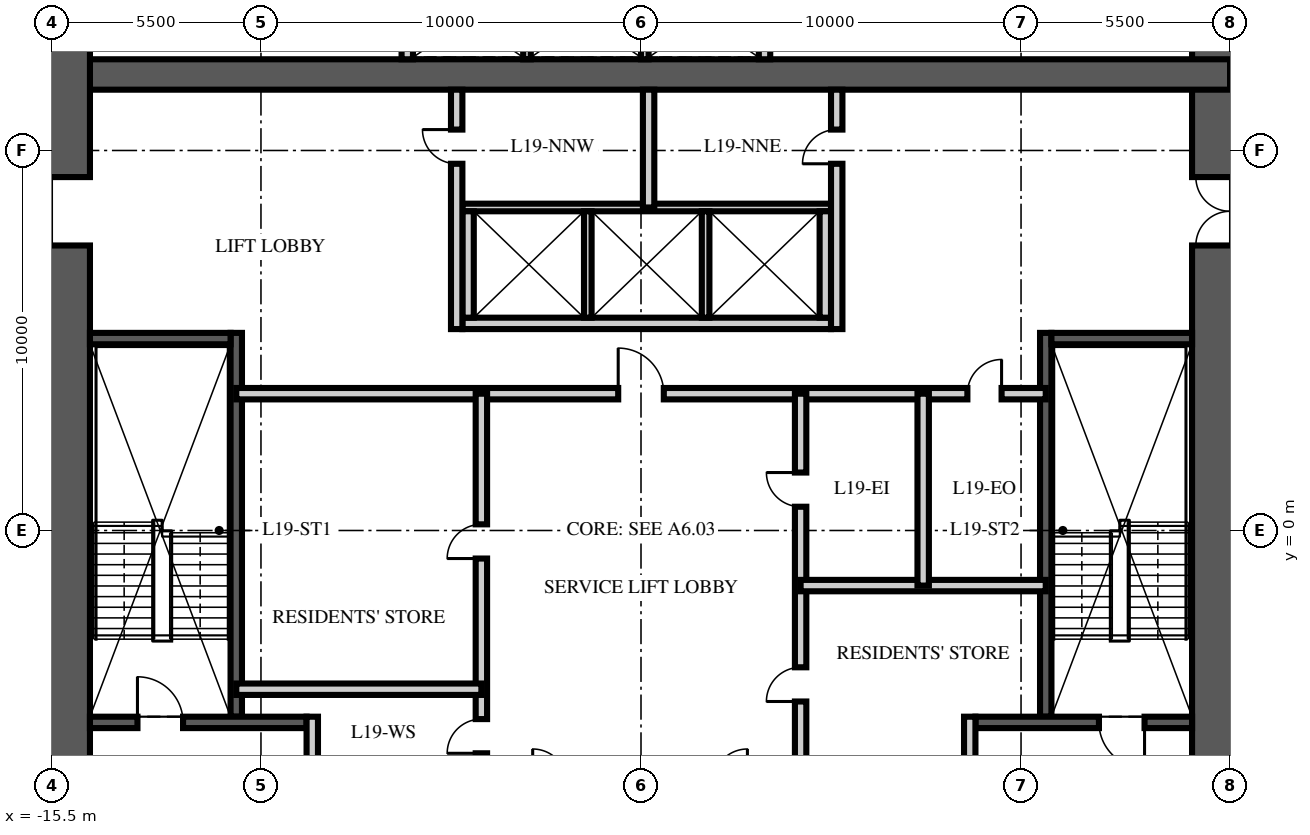
"""IFC4 building model, lengths in metres.
Left out: names, types, materials, properties, quantities, classifications, styles, units other than length and angle.
Written with IfcOpenShell. Run it as: python <this file> out.ifc"""

import sys

from ifc_helpers import new_model, si_unit, direction, frame, frame_2d, origin, place, context, subcontext, project, spatial, rectangle, extrude, element, fill, save


model = new_model("IFC4")
c1 = context("Model", 3, precision=1e-05, world=origin(), true_north=direction((0.0, 1.0)))
c2 = subcontext(c1, "Body", "Model", "MODEL_VIEW")
j1 = project(units=[si_unit("LENGTHUNIT", "METRE"), si_unit("PLANEANGLEUNIT", "RADIAN")], contexts=[c1])
p1 = place(None, origin())
s1 = spatial("IfcSite", under=j1, at=p1, CompositionType="ELEMENT")
p2 = place(p1, origin())
s2 = spatial("IfcBuilding", under=s1, at=p2, CompositionType="ELEMENT")
p3 = place(p2, frame((0.0, 0.0, 77.25)))
s3 = spatial("IfcBuildingStorey", under=s2, at=p3, CompositionType="ELEMENT", Elevation=77.25)
p4 = place(p3, frame((15.5, -15.5, -0.25), z_axis=(0.0, 0.0, 1.0), x_axis=(0.0, 1.0, 0.0)))
e1 = element("IfcWall", 1, at=p4, inside=s3, PredefinedType="SHEAR", context=c2, shape_type="SweptSolid", body=[
    extrude(rectangle(XDim=31.0, YDim=2.0, at=frame_2d((15.5, 0.0))), origin(), (0.0, 0.0, 1.0), 3.75),
])
p5 = place(p4, frame((6.5, 0.0, 0.25)))
e2 = element("IfcOpeningElement", 2, at=p5, cuts=e1, PredefinedType="OPENING", context=c2, shape_type="SweptSolid", body=[
    extrude(rectangle(XDim=1.2, YDim=2.1, at=frame_2d((0.6, 1.05))), frame((0.0, 1.01, 0.0), z_axis=(0.0, -1.0, 0.0), x_axis=(1.0, 0.0, 0.0)), (0.0, 0.0, 1.0), 2.02),
])
p6 = place(p4, frame((23.0, 0.0, 0.25)))
e3 = element("IfcOpeningElement", 3, at=p6, cuts=e1, PredefinedType="OPENING", context=c2, shape_type="SweptSolid", body=[
    extrude(rectangle(XDim=1.8, YDim=2.1, at=frame_2d((0.9, 1.05))), frame((0.0, 1.01, 0.0), z_axis=(0.0, -1.0, 0.0), x_axis=(1.0, 0.0, 0.0)), (0.0, 0.0, 1.0), 2.02),
])
p7 = place(p3, frame((-15.5, 12.0, -0.25), z_axis=(0.0, 0.0, 1.0), x_axis=(1.0, 0.0, 0.0)))
e4 = element("IfcWall", 4, at=p7, inside=s3, PredefinedType="SHEAR", context=c2, shape_type="SweptSolid", body=[
    extrude(rectangle(XDim=31.0, YDim=0.8, at=frame_2d((15.5, 0.0))), origin(), (0.0, 0.0, 1.0), 3.75),
])
p8 = place(p3, frame((-15.5, -15.5, -0.25), z_axis=(0.0, 0.0, 1.0), x_axis=(0.0, 1.0, 0.0)))
e5 = element("IfcWall", 5, at=p8, inside=s3, PredefinedType="SHEAR", context=c2, shape_type="SweptSolid", body=[
    extrude(rectangle(XDim=31.0, YDim=2.0, at=frame_2d((15.5, 0.0))), origin(), (0.0, 0.0, 1.0), 3.75),
])
p9 = place(p8, frame((6.5, 0.0, 0.25)))
e6 = element("IfcOpeningElement", 6, at=p9, cuts=e5, PredefinedType="OPENING", context=c2, shape_type="SweptSolid", body=[
    extrude(rectangle(XDim=1.2, YDim=2.1, at=frame_2d((0.6, 1.05))), frame((0.0, 1.01, 0.0), z_axis=(0.0, -1.0, 0.0), x_axis=(1.0, 0.0, 0.0)), (0.0, 0.0, 1.0), 2.02),
])
p10 = place(p8, frame((23.0, 0.0, 0.25)))
e7 = element("IfcOpeningElement", 7, at=p10, cuts=e5, PredefinedType="OPENING", context=c2, shape_type="SweptSolid", body=[
    extrude(rectangle(XDim=1.8, YDim=2.1, at=frame_2d((0.9, 1.05))), frame((0.0, 1.01, 0.0), z_axis=(0.0, -1.0, 0.0), x_axis=(1.0, 0.0, 0.0)), (0.0, 0.0, 1.0), 2.02),
])
p11 = place(p3, frame((-10.65, -4.9, 0.0), z_axis=(0.0, 0.0, 1.0), x_axis=(0.0, 1.0, 0.0)))
e8 = element("IfcWall", 8, at=p11, inside=s3, PredefinedType="SOLIDWALL", context=c2, shape_type="SweptSolid", body=[
    extrude(rectangle(XDim=10.1, YDim=0.3, at=frame_2d((5.05, 0.0))), origin(), (0.0, 0.0, 1.0), 3.5),
])
p12 = place(p3, frame((-14.5, -5.05, 0.0), z_axis=(0.0, 0.0, 1.0), x_axis=(1.0, 0.0, 0.0)))
e9 = element("IfcWall", 9, at=p12, inside=s3, PredefinedType="SOLIDWALL", context=c2, shape_type="SweptSolid", body=[
    extrude(rectangle(XDim=5.7, YDim=0.3, at=frame_2d((2.85, 0.0))), origin(), (0.0, 0.0, 1.0), 3.5),
])
p13 = place(p12, frame((1.25, 0.0, 0.0)))
e10 = element("IfcOpeningElement", 10, at=p13, cuts=e9, PredefinedType="OPENING", context=c2, shape_type="SweptSolid", body=[
    extrude(rectangle(XDim=1.2, YDim=2.1, at=frame_2d((0.6, 1.05))), frame((0.0, 0.16, 0.0), z_axis=(0.0, -1.0, 0.0), x_axis=(1.0, 0.0, 0.0)), (0.0, 0.0, 1.0), 0.32),
])
p14 = place(p3, frame((-14.5, 5.05, 0.0), z_axis=(0.0, 0.0, 1.0), x_axis=(1.0, 0.0, 0.0)))
e11 = element("IfcWall", 11, at=p14, inside=s3, PredefinedType="SOLIDWALL", context=c2, shape_type="SweptSolid", body=[
    extrude(rectangle(XDim=3.7, YDim=0.3, at=frame_2d((1.85, 0.0))), origin(), (0.0, 0.0, 1.0), 3.5),
])
p15 = place(p3, frame((-8.65, -11.6, 0.0), z_axis=(0.0, 0.0, 1.0), x_axis=(0.0, 1.0, 0.0)))
e12 = element("IfcWall", 12, at=p15, inside=s3, PredefinedType="PARTITIONING", context=c2, shape_type="SweptSolid", body=[
    extrude(rectangle(XDim=6.7, YDim=0.3, at=frame_2d((3.35, 0.0))), origin(), (0.0, 0.0, 1.0), 3.5),
])
p16 = place(p15, frame((2.85, 0.0, 0.0)))
e13 = element("IfcOpeningElement", 13, at=p16, cuts=e12, PredefinedType="OPENING", context=c2, shape_type="SweptSolid", body=[
    extrude(rectangle(XDim=1.1, YDim=2.1, at=frame_2d((0.55, 1.05))), frame((0.0, 0.16, 0.0), z_axis=(0.0, -1.0, 0.0), x_axis=(1.0, 0.0, 0.0)), (0.0, 0.0, 1.0), 0.32),
])
p17 = place(p3, frame((10.65, -4.9, 0.0), z_axis=(0.0, 0.0, 1.0), x_axis=(0.0, 1.0, 0.0)))
e14 = element("IfcWall", 14, at=p17, inside=s3, PredefinedType="SOLIDWALL", context=c2, shape_type="SweptSolid", body=[
    extrude(rectangle(XDim=10.1, YDim=0.3, at=frame_2d((5.05, 0.0))), origin(), (0.0, 0.0, 1.0), 3.5),
])
p18 = place(p3, frame((14.5, -5.05, 0.0), z_axis=(0.0, 0.0, 1.0), x_axis=(-1.0, 0.0, 0.0)))
e15 = element("IfcWall", 15, at=p18, inside=s3, PredefinedType="SOLIDWALL", context=c2, shape_type="SweptSolid", body=[
    extrude(rectangle(XDim=5.7, YDim=0.3, at=frame_2d((2.85, 0.0))), origin(), (0.0, 0.0, 1.0), 3.5),
])
p19 = place(p18, frame((1.25, 0.0, 0.0)))
e16 = element("IfcOpeningElement", 16, at=p19, cuts=e15, PredefinedType="OPENING", context=c2, shape_type="SweptSolid", body=[
    extrude(rectangle(XDim=1.2, YDim=2.1, at=frame_2d((0.6, 1.05))), frame((0.0, 0.16, 0.0), z_axis=(0.0, -1.0, 0.0), x_axis=(1.0, 0.0, 0.0)), (0.0, 0.0, 1.0), 0.32),
])
p20 = place(p3, frame((14.5, 5.05, 0.0), z_axis=(0.0, 0.0, 1.0), x_axis=(-1.0, 0.0, 0.0)))
e17 = element("IfcWall", 17, at=p20, inside=s3, PredefinedType="SOLIDWALL", context=c2, shape_type="SweptSolid", body=[
    extrude(rectangle(XDim=3.7, YDim=0.3, at=frame_2d((1.85, 0.0))), origin(), (0.0, 0.0, 1.0), 3.5),
])
p21 = place(p3, frame((8.65, -11.6, 0.0), z_axis=(0.0, 0.0, 1.0), x_axis=(0.0, 1.0, 0.0)))
e18 = element("IfcWall", 18, at=p21, inside=s3, PredefinedType="PARTITIONING", context=c2, shape_type="SweptSolid", body=[
    extrude(rectangle(XDim=6.7, YDim=0.3, at=frame_2d((3.35, 0.0))), origin(), (0.0, 0.0, 1.0), 3.5),
])
p22 = place(p21, frame((2.85, 0.0, 0.0)))
e19 = element("IfcOpeningElement", 19, at=p22, cuts=e18, PredefinedType="OPENING", context=c2, shape_type="SweptSolid", body=[
    extrude(rectangle(XDim=1.1, YDim=2.1, at=frame_2d((0.55, 1.05))), frame((0.0, 0.16, 0.0), z_axis=(0.0, -1.0, 0.0), x_axis=(1.0, 0.0, 0.0)), (0.0, 0.0, 1.0), 0.32),
])
p23 = place(p3, frame((-4.7, 5.45, 0.0), z_axis=(0.0, 0.0, 1.0), x_axis=(1.0, 0.0, 0.0)))
e20 = element("IfcWall", 20, at=p23, inside=s3, PredefinedType="PARTITIONING", context=c2, shape_type="SweptSolid", body=[
    extrude(rectangle(XDim=9.7, YDim=0.3, at=frame_2d((4.85, 0.0))), origin(), (0.0, 0.0, 1.0), 3.5),
])
p24 = place(p3, frame((-4.7, 8.5, 0.0), z_axis=(0.0, 0.0, 1.0), x_axis=(1.0, 0.0, 0.0)))
e21 = element("IfcWall", 21, at=p24, inside=s3, PredefinedType="PARTITIONING", context=c2, shape_type="SweptSolid", body=[
    extrude(rectangle(XDim=9.7, YDim=0.2, at=frame_2d((4.85, 0.0))), origin(), (0.0, 0.0, 1.0), 3.5),
])
for number, where, z_axis, x_axis in (
    (22, (-4.55, 5.6, 0.0), (0.0, 0.0, 1.0), (0.0, 1.0, 0.0)),
    (23, (4.85, 5.6, 0.0), (0.0, 0.0, 1.0), (0.0, 1.0, 0.0)),
):
    element("IfcWall", number, at=place(p3, frame(where, z_axis=z_axis, x_axis=x_axis)), inside=s3, PredefinedType="PARTITIONING", context=c2, shape_type="SweptSolid", body=[
        extrude(rectangle(XDim=2.8, YDim=0.3, at=frame_2d((1.4, 0.0))), origin(), (0.0, 0.0, 1.0), 3.5),
    ])
for number, where, z_axis, x_axis in (
    (24, (-1.4, 5.6, 0.0), (0.0, 0.0, 1.0), (0.0, 1.0, 0.0)),
    (25, (1.7, 5.6, 0.0), (0.0, 0.0, 1.0), (0.0, 1.0, 0.0)),
):
    element("IfcWall", number, at=place(p3, frame(where, z_axis=z_axis, x_axis=x_axis)), inside=s3, PredefinedType="PARTITIONING", context=c2, shape_type="SweptSolid", body=[
        extrude(rectangle(XDim=2.8, YDim=0.2, at=frame_2d((1.4, 0.0))), origin(), (0.0, 0.0, 1.0), 3.5),
    ])
for number, where, z_axis, x_axis in (
    (26, (-6.15, 12.4, 0.0), (0.0, 0.0, 1.0), (0.0, 1.0, 0.0)),
    (27, (3.25, 12.4, 0.0), (0.0, 0.0, 1.0), (0.0, 1.0, 0.0)),
):
    element("IfcWall", number, at=place(p3, frame(where, z_axis=z_axis, x_axis=x_axis)), inside=s3, PredefinedType="PARTITIONING", context=c2, shape_type="SweptSolid", body=[
        extrude(rectangle(XDim=2.1, YDim=0.3, at=frame_2d((1.05, 0.0))), origin(), (0.0, 0.0, 1.0), 3.5),
    ])
for number, where, z_axis, x_axis in (
    (28, (-3.0, 12.4, 0.0), (0.0, 0.0, 1.0), (0.0, 1.0, 0.0)),
    (29, (0.1, 12.4, 0.0), (0.0, 0.0, 1.0), (0.0, 1.0, 0.0)),
):
    element("IfcWall", number, at=place(p3, frame(where, z_axis=z_axis, x_axis=x_axis)), inside=s3, PredefinedType="PARTITIONING", context=c2, shape_type="SweptSolid", body=[
        extrude(rectangle(XDim=2.1, YDim=0.2, at=frame_2d((1.05, 0.0))), origin(), (0.0, 0.0, 1.0), 3.5),
    ])
p25 = place(p3, frame((-10.65, 3.6, 0.0), z_axis=(0.0, 0.0, 1.0), x_axis=(1.0, 0.0, 0.0)))
e30 = element("IfcWall", 30, at=p25, inside=s3, PredefinedType="PARTITIONING", context=c2, shape_type="SweptSolid", body=[
    extrude(rectangle(XDim=21.3, YDim=0.3, at=frame_2d((10.65, 0.0))), origin(), (0.0, 0.0, 1.0), 3.5),
])
p26 = place(p25, frame((10.05, 0.0, 0.0)))
e31 = element("IfcOpeningElement", 31, at=p26, cuts=e30, PredefinedType="OPENING", context=c2, shape_type="SweptSolid", body=[
    extrude(rectangle(XDim=1.2, YDim=2.1, at=frame_2d((0.6, 1.05))), frame((0.0, 0.16, 0.0), z_axis=(0.0, -1.0, 0.0), x_axis=(1.0, 0.0, 0.0)), (0.0, 0.0, 1.0), 0.32),
])
p27 = place(p25, frame((19.238, 0.0, 0.0)))
e32 = element("IfcOpeningElement", 32, at=p27, cuts=e30, PredefinedType="OPENING", context=c2, shape_type="SweptSolid", body=[
    extrude(rectangle(XDim=0.9, YDim=2.1, at=frame_2d((0.45, 1.05))), frame((0.0, 0.16, 0.0), z_axis=(0.0, -1.0, 0.0), x_axis=(1.0, 0.0, 0.0)), (0.0, 0.0, 1.0), 0.32),
])
p28 = place(p3, frame((-4.2, -6.65, 0.0), z_axis=(0.0, 0.0, 1.0), x_axis=(0.0, 1.0, 0.0)))
e33 = element("IfcWall", 33, at=p28, inside=s3, PredefinedType="PARTITIONING", context=c2, shape_type="SweptSolid", body=[
    extrude(rectangle(XDim=10.25, YDim=0.3, at=frame_2d((5.125, 0.0))), origin(), (0.0, 0.0, 1.0), 3.5),
])
p29 = place(p28, frame((0.787, 0.0, 0.0)))
e34 = element("IfcOpeningElement", 34, at=p29, cuts=e33, PredefinedType="OPENING", context=c2, shape_type="SweptSolid", body=[
    extrude(rectangle(XDim=0.9, YDim=2.1, at=frame_2d((0.45, 1.05))), frame((0.0, 0.16, 0.0), z_axis=(0.0, -1.0, 0.0), x_axis=(1.0, 0.0, 0.0)), (0.0, 0.0, 1.0), 0.32),
])
p30 = place(p28, frame((5.912, 0.0, 0.0)))
e35 = element("IfcOpeningElement", 35, at=p30, cuts=e33, PredefinedType="OPENING", context=c2, shape_type="SweptSolid", body=[
    extrude(rectangle(XDim=0.9, YDim=2.1, at=frame_2d((0.45, 1.05))), frame((0.0, 0.16, 0.0), z_axis=(0.0, -1.0, 0.0), x_axis=(1.0, 0.0, 0.0)), (0.0, 0.0, 1.0), 0.32),
])
p31 = place(p3, frame((4.2, -6.65, 0.0), z_axis=(0.0, 0.0, 1.0), x_axis=(0.0, 1.0, 0.0)))
e36 = element("IfcWall", 36, at=p31, inside=s3, PredefinedType="PARTITIONING", context=c2, shape_type="SweptSolid", body=[
    extrude(rectangle(XDim=10.25, YDim=0.3, at=frame_2d((5.125, 0.0))), origin(), (0.0, 0.0, 1.0), 3.5),
])
p32 = place(p31, frame((2.15, 0.0, 0.0)))
e37 = element("IfcOpeningElement", 37, at=p32, cuts=e36, PredefinedType="OPENING", context=c2, shape_type="SweptSolid", body=[
    extrude(rectangle(XDim=0.9, YDim=2.1, at=frame_2d((0.45, 1.05))), frame((0.0, 0.16, 0.0), z_axis=(0.0, -1.0, 0.0), x_axis=(1.0, 0.0, 0.0)), (0.0, 0.0, 1.0), 0.32),
])
p33 = place(p31, frame((7.275, 0.0, 0.0)))
e38 = element("IfcOpeningElement", 38, at=p33, cuts=e36, PredefinedType="OPENING", context=c2, shape_type="SweptSolid", body=[
    extrude(rectangle(XDim=0.9, YDim=2.1, at=frame_2d((0.45, 1.05))), frame((0.0, 0.16, 0.0), z_axis=(0.0, -1.0, 0.0), x_axis=(1.0, 0.0, 0.0)), (0.0, 0.0, 1.0), 0.32),
])
for number, where, z_axis, x_axis in (
    (39, (-10.65, -4.177, 0.0), (0.0, 0.0, 1.0), (1.0, 0.0, 0.0)),
    (40, (10.65, -1.45, 0.0), (0.0, 0.0, 1.0), (-1.0, 0.0, 0.0)),
):
    element("IfcWall", number, at=place(p3, frame(where, z_axis=z_axis, x_axis=x_axis)), inside=s3, PredefinedType="PARTITIONING", context=c2, shape_type="SweptSolid", body=[
        extrude(rectangle(XDim=6.45, YDim=0.3, at=frame_2d((3.225, 0.0))), origin(), (0.0, 0.0, 1.0), 3.5),
    ])
p34 = place(p3, frame((7.425, -1.45, 0.0), z_axis=(0.0, 0.0, 1.0), x_axis=(0.0, 1.0, 0.0)))
e41 = element("IfcWall", 41, at=p34, inside=s3, PredefinedType="PARTITIONING", context=c2, shape_type="SweptSolid", body=[
    extrude(rectangle(XDim=5.05, YDim=0.3, at=frame_2d((2.525, 0.0))), origin(), (0.0, 0.0, 1.0), 3.5),
])
p35 = place(p3, frame((-4.85, 5.3, 0.0), z_axis=(0.0, 0.0, 1.0), x_axis=(0.0, 1.0, 0.0)))
e42 = element("IfcWall", 42, at=p35, inside=s3, PredefinedType="PARTITIONING", context=c2, shape_type="SweptSolid", body=[
    extrude(rectangle(XDim=6.3, YDim=0.3, at=frame_2d((3.15, 0.0))), origin(), (0.0, 0.0, 1.0), 3.5),
])
p36 = place(p35, frame((4.35, 0.0, 0.0)))
e43 = element("IfcOpeningElement", 43, at=p36, cuts=e42, PredefinedType="OPENING", context=c2, shape_type="SweptSolid", body=[
    extrude(rectangle(XDim=0.9, YDim=2.1, at=frame_2d((0.45, 1.05))), frame((0.0, 0.16, 0.0), z_axis=(0.0, -1.0, 0.0), x_axis=(1.0, 0.0, 0.0)), (0.0, 0.0, 1.0), 0.32),
])
p37 = place(p3, frame((5.15, 5.3, 0.0), z_axis=(0.0, 0.0, 1.0), x_axis=(0.0, 1.0, 0.0)))
e44 = element("IfcWall", 44, at=p37, inside=s3, PredefinedType="PARTITIONING", context=c2, shape_type="SweptSolid", body=[
    extrude(rectangle(XDim=6.3, YDim=0.3, at=frame_2d((3.15, 0.0))), origin(), (0.0, 0.0, 1.0), 3.5),
])
p38 = place(p37, frame((4.35, 0.0, 0.0)))
e45 = element("IfcOpeningElement", 45, at=p38, cuts=e44, PredefinedType="OPENING", context=c2, shape_type="SweptSolid", body=[
    extrude(rectangle(XDim=0.9, YDim=2.1, at=frame_2d((0.45, 1.05))), frame((0.0, 0.16, 0.0), z_axis=(0.0, -1.0, 0.0), x_axis=(1.0, 0.0, 0.0)), (0.0, 0.0, 1.0), 0.32),
])
p39 = place(p3, frame((0.2, 8.5, 0.0), z_axis=(0.0, 0.0, 1.0), x_axis=(0.0, 1.0, 0.0)))
e46 = element("IfcWall", 46, at=p39, inside=s3, PredefinedType="PARTITIONING", context=c2, shape_type="SweptSolid", body=[
    extrude(rectangle(XDim=3.1, YDim=0.3, at=frame_2d((1.55, 0.0))), origin(), (0.0, 0.0, 1.0), 3.5),
])
p40 = place(p13, origin())
e47 = element("IfcDoor", 47, at=p40, inside=s3, OperationType="SINGLE_SWING_LEFT", PredefinedType="DOOR", context=c2, shape_type="SweptSolid", body=[
    extrude(rectangle(XDim=1.2, YDim=2.1, at=frame_2d((0.6, 1.05))), frame((0.0, 0.025, 0.0), z_axis=(0.0, -1.0, 0.0), x_axis=(1.0, 0.0, 0.0)), (0.0, 0.0, 1.0), 0.05),
])
fill(e10, e47)
p41 = place(p10, origin())
e48 = element("IfcDoor", 48, at=p41, inside=s3, OperationType="DOUBLE_DOOR_SINGLE_SWING", PredefinedType="DOOR", context=c2, shape_type="SweptSolid", body=[
    extrude(rectangle(XDim=1.8, YDim=2.1, at=frame_2d((0.9, 1.05))), frame((0.0, 0.025, 0.0), z_axis=(0.0, -1.0, 0.0), x_axis=(1.0, 0.0, 0.0)), (0.0, 0.0, 1.0), 0.05),
])
fill(e7, e48)
p42 = place(p19, origin())
e49 = element("IfcDoor", 49, at=p42, inside=s3, OperationType="SINGLE_SWING_LEFT", PredefinedType="DOOR", context=c2, shape_type="SweptSolid", body=[
    extrude(rectangle(XDim=1.2, YDim=2.1, at=frame_2d((0.6, 1.05))), frame((0.0, 0.025, 0.0), z_axis=(0.0, -1.0, 0.0), x_axis=(1.0, 0.0, 0.0)), (0.0, 0.0, 1.0), 0.05),
])
fill(e16, e49)
p43 = place(p6, origin())
e50 = element("IfcDoor", 50, at=p43, inside=s3, OperationType="DOUBLE_DOOR_SINGLE_SWING", PredefinedType="DOOR", context=c2, shape_type="SweptSolid", body=[
    extrude(rectangle(XDim=1.8, YDim=2.1, at=frame_2d((0.9, 1.05))), frame((0.0, 0.025, 0.0), z_axis=(0.0, -1.0, 0.0), x_axis=(1.0, 0.0, 0.0)), (0.0, 0.0, 1.0), 0.05),
])
fill(e3, e50)
p44 = place(p26, origin())
e51 = element("IfcDoor", 51, at=p44, inside=s3, OperationType="SINGLE_SWING_LEFT", PredefinedType="DOOR", context=c2, shape_type="SweptSolid", body=[
    extrude(rectangle(XDim=1.2, YDim=2.1, at=frame_2d((0.6, 1.05))), frame((0.0, 0.025, 0.0), z_axis=(0.0, -1.0, 0.0), x_axis=(1.0, 0.0, 0.0)), (0.0, 0.0, 1.0), 0.05),
])
fill(e31, e51)
p45 = place(p29, origin())
e52 = element("IfcDoor", 52, at=p45, inside=s3, OperationType="SINGLE_SWING_LEFT", PredefinedType="DOOR", context=c2, shape_type="SweptSolid", body=[
    extrude(rectangle(XDim=0.9, YDim=2.1, at=frame_2d((0.45, 1.05))), frame((0.0, 0.025, 0.0), z_axis=(0.0, -1.0, 0.0), x_axis=(1.0, 0.0, 0.0)), (0.0, 0.0, 1.0), 0.05),
])
fill(e34, e52)
p46 = place(p30, origin())
e53 = element("IfcDoor", 53, at=p46, inside=s3, OperationType="SINGLE_SWING_LEFT", PredefinedType="DOOR", context=c2, shape_type="SweptSolid", body=[
    extrude(rectangle(XDim=0.9, YDim=2.1, at=frame_2d((0.45, 1.05))), frame((0.0, 0.025, 0.0), z_axis=(0.0, -1.0, 0.0), x_axis=(1.0, 0.0, 0.0)), (0.0, 0.0, 1.0), 0.05),
])
fill(e35, e53)
p47 = place(p32, origin())
e54 = element("IfcDoor", 54, at=p47, inside=s3, OperationType="SINGLE_SWING_LEFT", PredefinedType="DOOR", context=c2, shape_type="SweptSolid", body=[
    extrude(rectangle(XDim=0.9, YDim=2.1, at=frame_2d((0.45, 1.05))), frame((0.0, 0.025, 0.0), z_axis=(0.0, -1.0, 0.0), x_axis=(1.0, 0.0, 0.0)), (0.0, 0.0, 1.0), 0.05),
])
fill(e37, e54)
p48 = place(p33, origin())
e55 = element("IfcDoor", 55, at=p48, inside=s3, OperationType="SINGLE_SWING_RIGHT", PredefinedType="DOOR", context=c2, shape_type="SweptSolid", body=[
    extrude(rectangle(XDim=0.9, YDim=2.1, at=frame_2d((0.45, 1.05))), frame((0.0, 0.025, 0.0), z_axis=(0.0, -1.0, 0.0), x_axis=(1.0, 0.0, 0.0)), (0.0, 0.0, 1.0), 0.05),
])
fill(e38, e55)
p49 = place(p27, origin())
e56 = element("IfcDoor", 56, at=p49, inside=s3, OperationType="SINGLE_SWING_RIGHT", PredefinedType="DOOR", context=c2, shape_type="SweptSolid", body=[
    extrude(rectangle(XDim=0.9, YDim=2.1, at=frame_2d((0.45, 1.05))), frame((0.0, 0.025, 0.0), z_axis=(0.0, -1.0, 0.0), x_axis=(1.0, 0.0, 0.0)), (0.0, 0.0, 1.0), 0.05),
])
fill(e32, e56)
p50 = place(p36, origin())
e57 = element("IfcDoor", 57, at=p50, inside=s3, OperationType="SINGLE_SWING_RIGHT", PredefinedType="DOOR", context=c2, shape_type="SweptSolid", body=[
    extrude(rectangle(XDim=0.9, YDim=2.1, at=frame_2d((0.45, 1.05))), frame((0.0, 0.025, 0.0), z_axis=(0.0, -1.0, 0.0), x_axis=(1.0, 0.0, 0.0)), (0.0, 0.0, 1.0), 0.05),
])
fill(e43, e57)
p51 = place(p38, origin())
e58 = element("IfcDoor", 58, at=p51, inside=s3, OperationType="SINGLE_SWING_LEFT", PredefinedType="DOOR", context=c2, shape_type="SweptSolid", body=[
    extrude(rectangle(XDim=0.9, YDim=2.1, at=frame_2d((0.45, 1.05))), frame((0.0, 0.025, 0.0), z_axis=(0.0, -1.0, 0.0), x_axis=(1.0, 0.0, 0.0)), (0.0, 0.0, 1.0), 0.05),
])
fill(e45, e58)
save(model, sys.argv[1])
